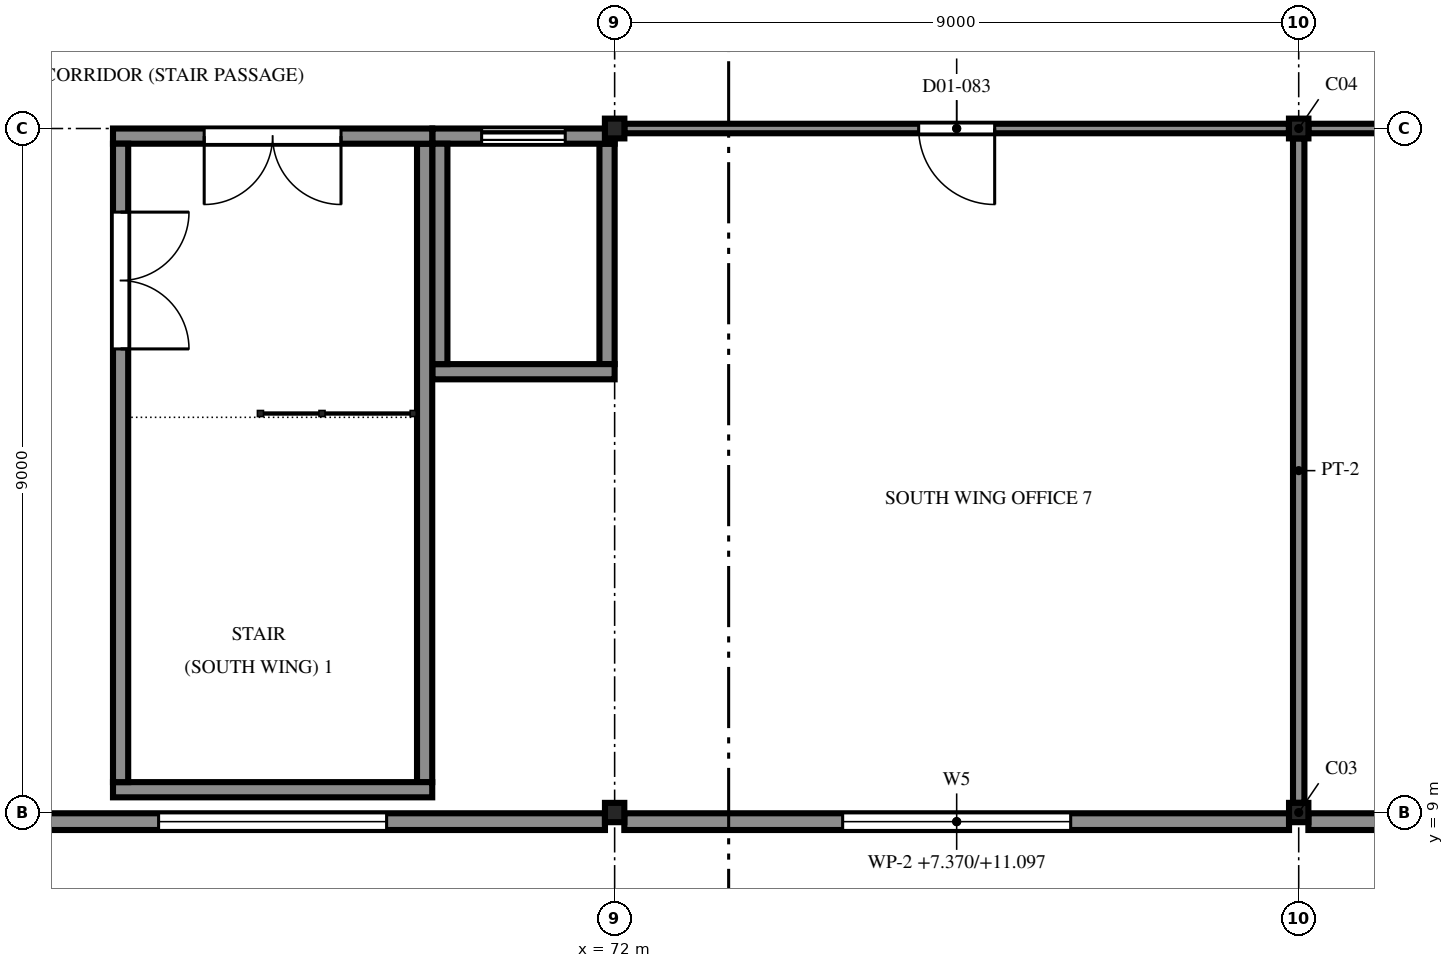
"""IFC4 building model, lengths in metres.
Left out: names, types, materials, properties, quantities, classifications, styles, units other than length and angle.
Written with IfcOpenShell. Run it as: python <this file> out.ifc"""

import sys

from ifc_helpers import new_model, si_unit, direction, frame, frame_2d, origin, origin_2d, place, context, subcontext, project, spatial, polyline, rectangle, i_section, outline, extrude, element, fill, save


model = new_model("IFC4")
c1 = context("Model", 3, precision=1e-05, world=origin(), true_north=direction((0.0, 1.0)))
c2 = subcontext(c1, "Body", "Model", "MODEL_VIEW")
j1 = project(units=[si_unit("LENGTHUNIT", "METRE"), si_unit("PLANEANGLEUNIT", "RADIAN")], contexts=[c1])
p1 = place(None, origin())
s1 = spatial("IfcSite", under=j1, at=p1, CompositionType="ELEMENT")
p2 = place(p1, origin())
s2 = spatial("IfcBuilding", under=s1, at=p2, CompositionType="ELEMENT")
p3 = place(p2, frame((0.0, 0.0, 7.5)))
s3 = spatial("IfcBuildingStorey", under=s2, at=p3, CompositionType="ELEMENT", Elevation=7.5)
p4 = place(p3, frame((72.0, 9.0, 0.0), z_axis=(0.0, 0.0, 1.0), x_axis=(1.0, 0.0, 0.0)))
e1 = element("IfcColumn", 1, at=p4, inside=s3, PredefinedType="COLUMN", context=c2, shape_type="SweptSolid", body=[
    extrude(i_section(OverallWidth=0.255, OverallDepth=0.254, WebThickness=0.009, FlangeThickness=0.014, FilletRadius=0.013, at=origin_2d()), origin(), (0.0, 0.0, 1.0), 4.2),
])
p5 = place(p3, frame((72.0, 18.0, 0.0), z_axis=(0.0, 0.0, 1.0), x_axis=(1.0, 0.0, 0.0)))
e2 = element("IfcColumn", 2, at=p5, inside=s3, PredefinedType="COLUMN", context=c2, shape_type="SweptSolid", body=[
    extrude(i_section(OverallWidth=0.256, OverallDepth=0.26, WebThickness=0.01, FlangeThickness=0.017, FilletRadius=0.013, at=origin_2d()), origin(), (0.0, 0.0, 1.0), 4.2),
])
p6 = place(p3, frame((81.0, 9.0, 0.0), z_axis=(0.0, 0.0, 1.0), x_axis=(1.0, 0.0, 0.0)))
e3 = element("IfcColumn", 3, at=p6, inside=s3, PredefinedType="COLUMN", context=c2, shape_type="SweptSolid", body=[
    extrude(i_section(OverallWidth=0.255, OverallDepth=0.254, WebThickness=0.009, FlangeThickness=0.014, FilletRadius=0.013, at=origin_2d()), origin(), (0.0, 0.0, 1.0), 4.2),
])
p7 = place(p3, frame((81.0, 18.0, 0.0), z_axis=(0.0, 0.0, 1.0), x_axis=(1.0, 0.0, 0.0)))
e4 = element("IfcColumn", 4, at=p7, inside=s3, PredefinedType="COLUMN", context=c2, shape_type="SweptSolid", body=[
    extrude(i_section(OverallWidth=0.256, OverallDepth=0.26, WebThickness=0.01, FlangeThickness=0.017, FilletRadius=0.013, at=origin_2d()), origin(), (0.0, 0.0, 1.0), 4.2),
])
p8 = place(p3, frame((63.127, 8.88, -0.13), z_axis=(0.0, 0.0, 1.0), x_axis=(1.0, 0.0, 0.0)))
e5 = element("IfcWall", 5, at=p8, inside=s3, PredefinedType="SOLIDWALL", context=c2, shape_type="SweptSolid", body=[
    extrude(rectangle(XDim=8.746, YDim=0.22, at=frame_2d((4.373, 0.0))), origin(), (0.0, 0.0, 1.0), 3.727),
])
p9 = place(p8, frame((2.873, 0.0, 1.03)))
e6 = element("IfcOpeningElement", 6, at=p9, cuts=e5, PredefinedType="OPENING", context=c2, shape_type="SweptSolid", body=[
    extrude(rectangle(XDim=3.0, YDim=2.1, at=frame_2d((1.5, 1.05))), frame((0.0, 0.12, 0.0), z_axis=(0.0, -1.0, 0.0), x_axis=(1.0, 0.0, 0.0)), (0.0, 0.0, 1.0), 0.24),
])
p10 = place(p3, frame((72.127, 8.88, -0.13), z_axis=(0.0, 0.0, 1.0), x_axis=(1.0, 0.0, 0.0)))
e7 = element("IfcWall", 7, at=p10, inside=s3, PredefinedType="SOLIDWALL", context=c2, shape_type="SweptSolid", body=[
    extrude(rectangle(XDim=8.746, YDim=0.22, at=frame_2d((4.373, 0.0))), origin(), (0.0, 0.0, 1.0), 3.727),
])
p11 = place(p10, frame((2.873, 0.0, 1.03)))
e8 = element("IfcOpeningElement", 8, at=p11, cuts=e7, PredefinedType="OPENING", context=c2, shape_type="SweptSolid", body=[
    extrude(rectangle(XDim=3.0, YDim=2.1, at=frame_2d((1.5, 1.05))), frame((0.0, 0.12, 0.0), z_axis=(0.0, -1.0, 0.0), x_axis=(1.0, 0.0, 0.0)), (0.0, 0.0, 1.0), 0.24),
])
p12 = place(p3, frame((81.127, 8.88, -0.13), z_axis=(0.0, 0.0, 1.0), x_axis=(1.0, 0.0, 0.0)))
e9 = element("IfcWall", 9, at=p12, inside=s3, PredefinedType="SOLIDWALL", context=c2, shape_type="SweptSolid", body=[
    extrude(rectangle(XDim=8.746, YDim=0.22, at=frame_2d((4.373, 0.0))), origin(), (0.0, 0.0, 1.0), 3.727),
])
p13 = place(p12, frame((2.873, 0.0, 1.03)))
e10 = element("IfcOpeningElement", 10, at=p13, cuts=e9, PredefinedType="OPENING", context=c2, shape_type="SweptSolid", body=[
    extrude(rectangle(XDim=3.0, YDim=2.1, at=frame_2d((1.5, 1.05))), frame((0.0, 0.12, 0.0), z_axis=(0.0, -1.0, 0.0), x_axis=(1.0, 0.0, 0.0)), (0.0, 0.0, 1.0), 0.24),
])
p14 = place(p3, frame((65.4, 9.3, 0.0), z_axis=(0.0, 0.0, 1.0), x_axis=(1.0, 0.0, 0.0)))
e11 = element("IfcWall", 11, at=p14, inside=s3, PredefinedType="SOLIDWALL", context=c2, shape_type="SweptSolid", body=[
    extrude(rectangle(XDim=4.2, YDim=0.2, at=frame_2d((2.1, 0.0))), origin(), (0.0, 0.0, 1.0), 3.59),
])
p15 = place(p3, frame((65.4, 17.9, -0.13), z_axis=(0.0, 0.0, 1.0), x_axis=(1.0, 0.0, 0.0)))
e12 = element("IfcWall", 12, at=p15, inside=s3, PredefinedType="SOLIDWALL", context=c2, shape_type="SweptSolid", body=[
    extrude(rectangle(XDim=4.2, YDim=0.2, at=frame_2d((2.1, 0.0))), origin(), (0.0, 0.0, 1.0), 3.72),
])
p16 = place(p15, frame((1.2, 0.0, 0.13)))
e13 = element("IfcOpeningElement", 13, at=p16, cuts=e12, PredefinedType="OPENING", context=c2, shape_type="SweptSolid", body=[
    extrude(rectangle(XDim=1.8, YDim=2.1, at=frame_2d((0.9, 1.05))), frame((0.0, 0.11, 0.0), z_axis=(0.0, -1.0, 0.0), x_axis=(1.0, 0.0, 0.0)), (0.0, 0.0, 1.0), 0.22),
])
p17 = place(p3, frame((65.5, 9.4, -0.13), z_axis=(0.0, 0.0, 1.0), x_axis=(0.0, 1.0, 0.0)))
e14 = element("IfcWall", 14, at=p17, inside=s3, PredefinedType="SOLIDWALL", context=c2, shape_type="SweptSolid", body=[
    extrude(rectangle(XDim=8.4, YDim=0.2, at=frame_2d((4.2, 0.0))), origin(), (0.0, 0.0, 1.0), 3.72),
])
p18 = place(p17, frame((5.7, 0.0, 0.13)))
e15 = element("IfcOpeningElement", 15, at=p18, cuts=e14, PredefinedType="OPENING", context=c2, shape_type="SweptSolid", body=[
    extrude(rectangle(XDim=1.8, YDim=2.1, at=frame_2d((0.9, 1.05))), frame((0.0, 0.11, 0.0), z_axis=(0.0, -1.0, 0.0), x_axis=(1.0, 0.0, 0.0)), (0.0, 0.0, 1.0), 0.22),
])
p19 = place(p3, frame((69.5, 9.4, -0.13), z_axis=(0.0, 0.0, 1.0), x_axis=(0.0, 1.0, 0.0)))
e16 = element("IfcWall", 16, at=p19, inside=s3, PredefinedType="SOLIDWALL", context=c2, shape_type="SweptSolid", body=[
    extrude(rectangle(XDim=8.4, YDim=0.2, at=frame_2d((4.2, 0.0))), origin(), (0.0, 0.0, 1.0), 3.72),
])
p20 = place(p3, frame((69.602, 14.8, 0.0), z_axis=(0.0, 0.0, 1.0), x_axis=(1.0, 0.0, 0.0)))
e17 = element("IfcWall", 17, at=p20, inside=s3, PredefinedType="SOLIDWALL", context=c2, shape_type="SweptSolid", body=[
    extrude(rectangle(XDim=2.398, YDim=0.2, at=frame_2d((1.199, 0.0))), origin(), (0.0, 0.0, 1.0), 3.516),
])
p21 = place(p3, frame((69.602, 17.9, 0.0), z_axis=(0.0, 0.0, 1.0), x_axis=(1.0, 0.0, 0.0)))
e18 = element("IfcWall", 18, at=p21, inside=s3, PredefinedType="SOLIDWALL", context=c2, shape_type="SweptSolid", body=[
    extrude(rectangle(XDim=2.398, YDim=0.2, at=frame_2d((1.199, 0.0))), origin(), (0.0, 0.0, 1.0), 3.516),
])
p22 = place(p21, frame((0.648, 0.0, 0.0)))
e19 = element("IfcOpeningElement", 19, at=p22, cuts=e18, PredefinedType="OPENING", context=c2, shape_type="SweptSolid", body=[
    extrude(rectangle(XDim=1.1, YDim=2.1, at=frame_2d((0.55, 1.05))), frame((0.0, 0.11, 0.0), z_axis=(0.0, -1.0, 0.0), x_axis=(1.0, 0.0, 0.0)), (0.0, 0.0, 1.0), 0.22),
])
for number, where, z_axis, x_axis in (
    (20, (69.7, 14.9, 0.0), (0.0, 0.0, 1.0), (0.0, 1.0, 0.0)),
    (21, (71.9, 14.9, 0.0), (0.0, 0.0, 1.0), (0.0, 1.0, 0.0)),
):
    element("IfcWall", number, at=place(p3, frame(where, z_axis=z_axis, x_axis=x_axis)), inside=s3, PredefinedType="SOLIDWALL", context=c2, shape_type="SweptSolid", body=[
        extrude(rectangle(XDim=2.9, YDim=0.2, at=frame_2d((1.45, 0.0))), origin(), (0.0, 0.0, 1.0), 3.516),
    ])
p23 = place(p3, frame((89.872, 18.0, 0.0), z_axis=(0.0, 0.0, 1.0), x_axis=(-1.0, 0.0, 0.0)))
e22 = element("IfcWall", 22, at=p23, inside=s3, PredefinedType="PARTITIONING", context=c2, shape_type="SweptSolid", body=[
    extrude(rectangle(XDim=8.744, YDim=0.125, at=frame_2d((4.372, 0.0))), origin(), (0.0, 0.0, 1.0), 3.307),
])
p24 = place(p23, frame((3.472, 0.0, 0.0)))
e23 = element("IfcOpeningElement", 23, at=p24, cuts=e22, PredefinedType="OPENING", context=c2, shape_type="SweptSolid", body=[
    extrude(rectangle(XDim=1.8, YDim=2.4, at=frame_2d((0.9, 1.2))), frame((0.0, 0.073, 0.0), z_axis=(0.0, -1.0, 0.0), x_axis=(1.0, 0.0, 0.0)), (0.0, 0.0, 1.0), 0.145),
])
p25 = place(p3, frame((80.872, 18.0, 0.0), z_axis=(0.0, 0.0, 1.0), x_axis=(-1.0, 0.0, 0.0)))
e24 = element("IfcWall", 24, at=p25, inside=s3, PredefinedType="PARTITIONING", context=c2, shape_type="SweptSolid", body=[
    extrude(rectangle(XDim=8.744, YDim=0.125, at=frame_2d((4.372, 0.0))), origin(), (0.0, 0.0, 1.0), 3.307),
])
p26 = place(p25, frame((3.872, 0.0, 0.0)))
e25 = element("IfcOpeningElement", 25, at=p26, cuts=e24, PredefinedType="OPENING", context=c2, shape_type="SweptSolid", body=[
    extrude(rectangle(XDim=1.0, YDim=2.1, at=frame_2d((0.5, 1.05))), frame((0.0, 0.073, 0.0), z_axis=(0.0, -1.0, 0.0), x_axis=(1.0, 0.0, 0.0)), (0.0, 0.0, 1.0), 0.145),
])
p27 = place(p3, frame((81.0, 9.127, 0.0), z_axis=(0.0, 0.0, 1.0), x_axis=(0.0, 1.0, 0.0)))
e26 = element("IfcWall", 26, at=p27, inside=s3, PredefinedType="PARTITIONING", context=c2, shape_type="SweptSolid", body=[
    extrude(rectangle(XDim=8.743, YDim=0.15, at=frame_2d((4.372, 0.0))), origin(), (0.0, 0.0, 1.0), 3.307),
])
p28 = place(p9, origin())
e27 = element("IfcWindow", 27, at=p28, inside=s3, PartitioningType="TRIPLE_PANEL_VERTICAL", PredefinedType="WINDOW", context=c2, shape_type="SweptSolid", body=[
    extrude(outline(polyline([(0.0, 0.0), (3.0, 0.0), (3.0, 2.1), (0.0, 2.1), (0.0, 0.0)]), holes=[polyline([(0.07, 0.07), (2.93, 0.07), (2.93, 2.03), (0.07, 2.03), (0.07, 0.07)])]), frame((0.0, 0.03, 0.0), z_axis=(0.0, -1.0, 0.0), x_axis=(1.0, 0.0, 0.0)), (0.0, 0.0, 1.0), 0.06),
    extrude(rectangle(XDim=0.04, YDim=1.96, at=frame_2d((1.017, 1.05))), frame((0.0, 0.022, 0.0), z_axis=(0.0, -1.0, 0.0), x_axis=(1.0, 0.0, 0.0)), (0.0, 0.0, 1.0), 0.044),
    extrude(rectangle(XDim=0.04, YDim=1.96, at=frame_2d((1.983, 1.05))), frame((0.0, 0.022, 0.0), z_axis=(0.0, -1.0, 0.0), x_axis=(1.0, 0.0, 0.0)), (0.0, 0.0, 1.0), 0.044),
    extrude(outline(polyline([(0.07, 0.07), (0.997, 0.07), (0.997, 2.03), (0.07, 2.03), (0.07, 0.07)]), holes=[polyline([(0.1, 0.1), (0.967, 0.1), (0.967, 2.0), (0.1, 2.0), (0.1, 0.1)])]), frame((0.0, 0.022, 0.0), z_axis=(0.0, -1.0, 0.0), x_axis=(1.0, 0.0, 0.0)), (0.0, 0.0, 1.0), 0.045),
    extrude(rectangle(XDim=0.866, YDim=1.9, at=frame_2d((0.533, 1.05))), frame((0.0, 0.006, 0.0), z_axis=(0.0, -1.0, 0.0), x_axis=(1.0, 0.0, 0.0)), (0.0, 0.0, 1.0), 0.012),
    extrude(outline(polyline([(1.037, 0.07), (1.963, 0.07), (1.963, 2.03), (1.037, 2.03), (1.037, 0.07)]), holes=[polyline([(1.067, 0.1), (1.933, 0.1), (1.933, 2.0), (1.067, 2.0), (1.067, 0.1)])]), frame((0.0, 0.022, 0.0), z_axis=(0.0, -1.0, 0.0), x_axis=(1.0, 0.0, 0.0)), (0.0, 0.0, 1.0), 0.045),
    extrude(rectangle(XDim=0.867, YDim=1.9, at=frame_2d((1.5, 1.05))), frame((0.0, 0.006, 0.0), z_axis=(0.0, -1.0, 0.0), x_axis=(1.0, 0.0, 0.0)), (0.0, 0.0, 1.0), 0.012),
    extrude(outline(polyline([(2.003, 0.07), (2.93, 0.07), (2.93, 2.03), (2.003, 2.03), (2.003, 0.07)]), holes=[polyline([(2.033, 0.1), (2.9, 0.1), (2.9, 2.0), (2.033, 2.0), (2.033, 0.1)])]), frame((0.0, 0.022, 0.0), z_axis=(0.0, -1.0, 0.0), x_axis=(1.0, 0.0, 0.0)), (0.0, 0.0, 1.0), 0.045),
    extrude(rectangle(XDim=0.866, YDim=1.9, at=frame_2d((2.467, 1.05))), frame((0.0, 0.006, 0.0), z_axis=(0.0, -1.0, 0.0), x_axis=(1.0, 0.0, 0.0)), (0.0, 0.0, 1.0), 0.012),
])
fill(e6, e27)
p29 = place(p11, origin())
e28 = element("IfcWindow", 28, at=p29, inside=s3, PartitioningType="TRIPLE_PANEL_VERTICAL", PredefinedType="WINDOW", context=c2, shape_type="SweptSolid", body=[
    extrude(outline(polyline([(0.0, 0.0), (3.0, 0.0), (3.0, 2.1), (0.0, 2.1), (0.0, 0.0)]), holes=[polyline([(0.07, 0.07), (2.93, 0.07), (2.93, 2.03), (0.07, 2.03), (0.07, 0.07)])]), frame((0.0, 0.03, 0.0), z_axis=(0.0, -1.0, 0.0), x_axis=(1.0, 0.0, 0.0)), (0.0, 0.0, 1.0), 0.06),
    extrude(rectangle(XDim=0.04, YDim=1.96, at=frame_2d((1.017, 1.05))), frame((0.0, 0.022, 0.0), z_axis=(0.0, -1.0, 0.0), x_axis=(1.0, 0.0, 0.0)), (0.0, 0.0, 1.0), 0.044),
    extrude(rectangle(XDim=0.04, YDim=1.96, at=frame_2d((1.983, 1.05))), frame((0.0, 0.022, 0.0), z_axis=(0.0, -1.0, 0.0), x_axis=(1.0, 0.0, 0.0)), (0.0, 0.0, 1.0), 0.044),
    extrude(outline(polyline([(0.07, 0.07), (0.997, 0.07), (0.997, 2.03), (0.07, 2.03), (0.07, 0.07)]), holes=[polyline([(0.1, 0.1), (0.967, 0.1), (0.967, 2.0), (0.1, 2.0), (0.1, 0.1)])]), frame((0.0, 0.022, 0.0), z_axis=(0.0, -1.0, 0.0), x_axis=(1.0, 0.0, 0.0)), (0.0, 0.0, 1.0), 0.045),
    extrude(rectangle(XDim=0.866, YDim=1.9, at=frame_2d((0.533, 1.05))), frame((0.0, 0.006, 0.0), z_axis=(0.0, -1.0, 0.0), x_axis=(1.0, 0.0, 0.0)), (0.0, 0.0, 1.0), 0.012),
    extrude(outline(polyline([(1.037, 0.07), (1.963, 0.07), (1.963, 2.03), (1.037, 2.03), (1.037, 0.07)]), holes=[polyline([(1.067, 0.1), (1.933, 0.1), (1.933, 2.0), (1.067, 2.0), (1.067, 0.1)])]), frame((0.0, 0.022, 0.0), z_axis=(0.0, -1.0, 0.0), x_axis=(1.0, 0.0, 0.0)), (0.0, 0.0, 1.0), 0.045),
    extrude(rectangle(XDim=0.867, YDim=1.9, at=frame_2d((1.5, 1.05))), frame((0.0, 0.006, 0.0), z_axis=(0.0, -1.0, 0.0), x_axis=(1.0, 0.0, 0.0)), (0.0, 0.0, 1.0), 0.012),
    extrude(outline(polyline([(2.003, 0.07), (2.93, 0.07), (2.93, 2.03), (2.003, 2.03), (2.003, 0.07)]), holes=[polyline([(2.033, 0.1), (2.9, 0.1), (2.9, 2.0), (2.033, 2.0), (2.033, 0.1)])]), frame((0.0, 0.022, 0.0), z_axis=(0.0, -1.0, 0.0), x_axis=(1.0, 0.0, 0.0)), (0.0, 0.0, 1.0), 0.045),
    extrude(rectangle(XDim=0.866, YDim=1.9, at=frame_2d((2.467, 1.05))), frame((0.0, 0.006, 0.0), z_axis=(0.0, -1.0, 0.0), x_axis=(1.0, 0.0, 0.0)), (0.0, 0.0, 1.0), 0.012),
])
fill(e8, e28)
p30 = place(p22, origin())
e29 = element("IfcDoor", 29, at=p30, inside=s3, OperationType="SLIDING_TO_LEFT", PredefinedType="DOOR", context=c2, shape_type="SweptSolid", body=[
    extrude(outline(polyline([(0.0, 0.0), (0.07, 0.0), (0.07, 2.03), (1.03, 2.03), (1.03, 0.0), (1.1, 0.0), (1.1, 2.1), (0.0, 2.1), (0.0, 0.0)])), frame((0.0, 0.025, 0.0), z_axis=(0.0, -1.0, 0.0), x_axis=(1.0, 0.0, 0.0)), (0.0, 0.0, 1.0), 0.05),
    extrude(rectangle(XDim=0.524, YDim=2.016, at=frame_2d((0.336, 1.018))), frame((0.0, 0.018, 0.0), z_axis=(0.0, -1.0, 0.0), x_axis=(1.0, 0.0, 0.0)), (0.0, 0.0, 1.0), 0.016),
    extrude(rectangle(XDim=0.52, YDim=2.016, at=frame_2d((0.766, 1.018))), frame((0.0, -0.002, 0.0), z_axis=(0.0, -1.0, 0.0), x_axis=(1.0, 0.0, 0.0)), (0.0, 0.0, 1.0), 0.016),
])
fill(e19, e29)
p31 = place(p26, origin())
e30 = element("IfcDoor", 30, at=p31, inside=s3, OperationType="SINGLE_SWING_LEFT", PredefinedType="DOOR", context=c2, shape_type="SweptSolid", body=[
    extrude(outline(polyline([(0.0, 0.0), (0.07, 0.0), (0.07, 2.03), (0.93, 2.03), (0.93, 0.0), (1.0, 0.0), (1.0, 2.1), (0.0, 2.1), (0.0, 0.0)])), frame((0.0, 0.025, 0.0), z_axis=(0.0, -1.0, 0.0), x_axis=(1.0, 0.0, 0.0)), (0.0, 0.0, 1.0), 0.05),
    extrude(outline(polyline([(0.074, 0.01), (0.926, 0.01), (0.926, 2.026), (0.074, 2.026), (0.074, 0.01)]), holes=[polyline([(0.194, 0.16), (0.806, 0.16), (0.806, 1.01), (0.194, 1.01), (0.194, 0.16)]), polyline([(0.35, 1.16), (0.65, 1.16), (0.65, 1.76), (0.35, 1.76), (0.35, 1.16)])]), frame((0.0, 0.017, 0.0), z_axis=(0.0, -1.0, 0.0), x_axis=(1.0, 0.0, 0.0)), (0.0, 0.0, 1.0), 0.035),
    extrude(rectangle(XDim=0.612, YDim=0.85, at=frame_2d((0.5, 0.585))), frame((0.0, 0.009, 0.0), z_axis=(0.0, -1.0, 0.0), x_axis=(1.0, 0.0, 0.0)), (0.0, 0.0, 1.0), 0.017),
    extrude(rectangle(XDim=0.3, YDim=0.6, at=frame_2d((0.5, 1.46))), frame((0.0, 0.006, 0.0), z_axis=(0.0, -1.0, 0.0), x_axis=(1.0, 0.0, 0.0)), (0.0, 0.0, 1.0), 0.012),
])
fill(e25, e30)
p32 = place(p18, frame((1.8, 0.0, 0.0), z_axis=(0.0, 0.0, 1.0), x_axis=(-1.0, 0.0, 0.0)))
e31 = element("IfcDoor", 31, at=p32, inside=s3, OperationType="DOUBLE_DOOR_SINGLE_SWING", PredefinedType="DOOR", context=c2, shape_type="SweptSolid", body=[
    extrude(outline(polyline([(0.0, 0.0), (0.07, 0.0), (0.07, 2.03), (1.73, 2.03), (1.73, 0.0), (1.8, 0.0), (1.8, 2.1), (0.0, 2.1), (0.0, 0.0)])), frame((0.0, 0.025, 0.0), z_axis=(0.0, -1.0, 0.0), x_axis=(1.0, 0.0, 0.0)), (0.0, 0.0, 1.0), 0.05),
    extrude(outline(polyline([(0.074, 0.01), (0.897, 0.01), (0.897, 2.026), (0.074, 2.026), (0.074, 0.01)]), holes=[polyline([(0.194, 0.16), (0.777, 0.16), (0.777, 1.01), (0.194, 1.01), (0.194, 0.16)]), polyline([(0.335, 1.16), (0.635, 1.16), (0.635, 1.76), (0.335, 1.76), (0.335, 1.16)])]), frame((0.0, 0.017, 0.0), z_axis=(0.0, -1.0, 0.0), x_axis=(1.0, 0.0, 0.0)), (0.0, 0.0, 1.0), 0.035),
    extrude(rectangle(XDim=0.583, YDim=0.85, at=frame_2d((0.485, 0.585))), frame((0.0, 0.009, 0.0), z_axis=(0.0, -1.0, 0.0), x_axis=(1.0, 0.0, 0.0)), (0.0, 0.0, 1.0), 0.017),
    extrude(rectangle(XDim=0.3, YDim=0.6, at=frame_2d((0.485, 1.46))), frame((0.0, 0.006, 0.0), z_axis=(0.0, -1.0, 0.0), x_axis=(1.0, 0.0, 0.0)), (0.0, 0.0, 1.0), 0.012),
    extrude(outline(polyline([(0.903, 0.01), (1.726, 0.01), (1.726, 2.026), (0.903, 2.026), (0.903, 0.01)]), holes=[polyline([(1.023, 0.16), (1.606, 0.16), (1.606, 1.01), (1.023, 1.01), (1.023, 0.16)]), polyline([(1.165, 1.16), (1.465, 1.16), (1.465, 1.76), (1.165, 1.76), (1.165, 1.16)])]), frame((0.0, 0.017, 0.0), z_axis=(0.0, -1.0, 0.0), x_axis=(1.0, 0.0, 0.0)), (0.0, 0.0, 1.0), 0.035),
    extrude(rectangle(XDim=0.583, YDim=0.85, at=frame_2d((1.314, 0.585))), frame((0.0, 0.009, 0.0), z_axis=(0.0, -1.0, 0.0), x_axis=(1.0, 0.0, 0.0)), (0.0, 0.0, 1.0), 0.017),
    extrude(rectangle(XDim=0.3, YDim=0.6, at=frame_2d((1.314, 1.46))), frame((0.0, 0.006, 0.0), z_axis=(0.0, -1.0, 0.0), x_axis=(1.0, 0.0, 0.0)), (0.0, 0.0, 1.0), 0.012),
])
fill(e15, e31)
p33 = place(p16, frame((1.8, 0.0, 0.0), z_axis=(0.0, 0.0, 1.0), x_axis=(-1.0, 0.0, 0.0)))
e32 = element("IfcDoor", 32, at=p33, inside=s3, OperationType="DOUBLE_DOOR_SINGLE_SWING", PredefinedType="DOOR", context=c2, shape_type="SweptSolid", body=[
    extrude(outline(polyline([(0.0, 0.0), (0.07, 0.0), (0.07, 2.03), (1.73, 2.03), (1.73, 0.0), (1.8, 0.0), (1.8, 2.1), (0.0, 2.1), (0.0, 0.0)])), frame((0.0, 0.025, 0.0), z_axis=(0.0, -1.0, 0.0), x_axis=(1.0, 0.0, 0.0)), (0.0, 0.0, 1.0), 0.05),
    extrude(outline(polyline([(0.074, 0.01), (0.897, 0.01), (0.897, 2.026), (0.074, 2.026), (0.074, 0.01)]), holes=[polyline([(0.194, 0.16), (0.777, 0.16), (0.777, 1.01), (0.194, 1.01), (0.194, 0.16)]), polyline([(0.335, 1.16), (0.635, 1.16), (0.635, 1.76), (0.335, 1.76), (0.335, 1.16)])]), frame((0.0, 0.017, 0.0), z_axis=(0.0, -1.0, 0.0), x_axis=(1.0, 0.0, 0.0)), (0.0, 0.0, 1.0), 0.035),
    extrude(rectangle(XDim=0.583, YDim=0.85, at=frame_2d((0.485, 0.585))), frame((0.0, 0.009, 0.0), z_axis=(0.0, -1.0, 0.0), x_axis=(1.0, 0.0, 0.0)), (0.0, 0.0, 1.0), 0.017),
    extrude(rectangle(XDim=0.3, YDim=0.6, at=frame_2d((0.485, 1.46))), frame((0.0, 0.006, 0.0), z_axis=(0.0, -1.0, 0.0), x_axis=(1.0, 0.0, 0.0)), (0.0, 0.0, 1.0), 0.012),
    extrude(outline(polyline([(0.903, 0.01), (1.726, 0.01), (1.726, 2.026), (0.903, 2.026), (0.903, 0.01)]), holes=[polyline([(1.023, 0.16), (1.606, 0.16), (1.606, 1.01), (1.023, 1.01), (1.023, 0.16)]), polyline([(1.165, 1.16), (1.465, 1.16), (1.465, 1.76), (1.165, 1.76), (1.165, 1.16)])]), frame((0.0, 0.017, 0.0), z_axis=(0.0, -1.0, 0.0), x_axis=(1.0, 0.0, 0.0)), (0.0, 0.0, 1.0), 0.035),
    extrude(rectangle(XDim=0.583, YDim=0.85, at=frame_2d((1.314, 0.585))), frame((0.0, 0.009, 0.0), z_axis=(0.0, -1.0, 0.0), x_axis=(1.0, 0.0, 0.0)), (0.0, 0.0, 1.0), 0.017),
    extrude(rectangle(XDim=0.3, YDim=0.6, at=frame_2d((1.314, 1.46))), frame((0.0, 0.006, 0.0), z_axis=(0.0, -1.0, 0.0), x_axis=(1.0, 0.0, 0.0)), (0.0, 0.0, 1.0), 0.012),
])
fill(e13, e32)
save(model, sys.argv[1])
